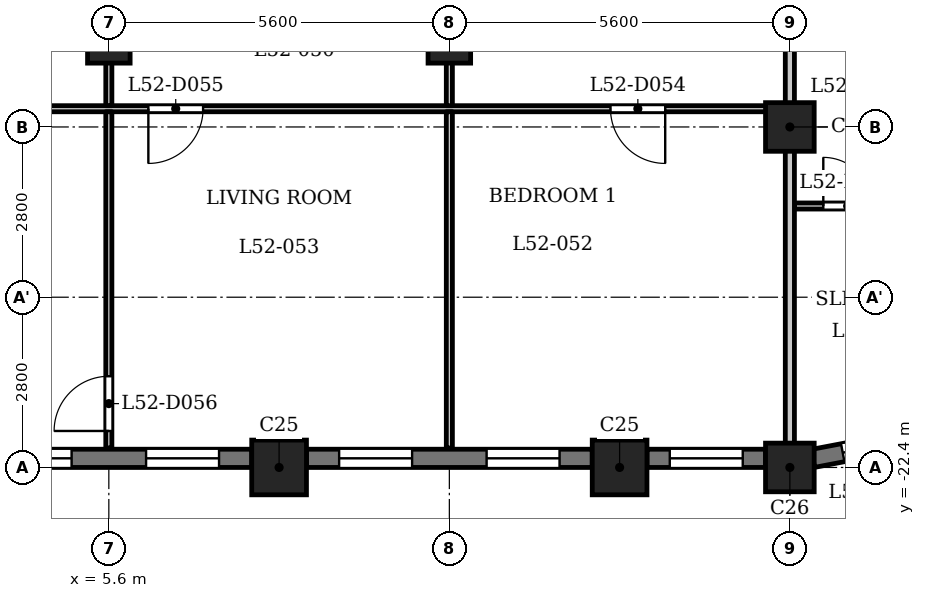
"""IFC4 building model, lengths in metres.
Left out: names, types, materials, properties, quantities, classifications, styles, units other than length and angle.
Written with IfcOpenShell. Run it as: python <this file> out.ifc"""

import sys

from ifc_helpers import new_model, si_unit, direction, frame, frame_2d, origin, origin_2d, place, context, subcontext, project, spatial, rectangle, extrude, element, fill, save


model = new_model("IFC4")
c1 = context("Model", 3, precision=1e-05, world=origin(), true_north=direction((0.0, 1.0)))
c2 = subcontext(c1, "Body", "Model", "MODEL_VIEW")
j1 = project(units=[si_unit("LENGTHUNIT", "METRE"), si_unit("PLANEANGLEUNIT", "RADIAN")], contexts=[c1])
p1 = place(None, origin())
s1 = spatial("IfcSite", under=j1, at=p1, CompositionType="ELEMENT")
p2 = place(p1, origin())
s2 = spatial("IfcBuilding", under=s1, at=p2, CompositionType="ELEMENT")
p3 = place(p2, frame((0.0, 0.0, 202.9)))
s3 = spatial("IfcBuildingStorey", under=s2, at=p3, CompositionType="ELEMENT", Elevation=202.9)
for number, where, z_axis, x_axis in (
    (1, (8.4, -22.4, 0.0), (0.0, 0.0, 1.0), (1.0, 0.0, 0.0)),
    (2, (14.0, -22.4, 0.0), (0.0, 0.0, 1.0), (1.0, 0.0, 0.0)),
):
    element("IfcColumn", number, at=place(p3, frame(where, z_axis=z_axis, x_axis=x_axis)), inside=s3, PredefinedType="COLUMN", context=c2, shape_type="SweptSolid", body=[
        extrude(rectangle(XDim=0.9, YDim=0.9, at=origin_2d()), origin(), (0.0, 0.0, 1.0), 3.5),
    ])
for number, where, z_axis, x_axis in (
    (3, (16.8, -22.4, 0.0), (0.0, 0.0, 1.0), (1.0, 0.0, 0.0)),
    (4, (16.8, -16.8, 0.0), (0.0, 0.0, 1.0), (1.0, 0.0, 0.0)),
):
    element("IfcColumn", number, at=place(p3, frame(where, z_axis=z_axis, x_axis=x_axis)), inside=s3, PredefinedType="COLUMN", context=c2, shape_type="SweptSolid", body=[
        extrude(rectangle(XDim=0.8, YDim=0.8, at=origin_2d()), origin(), (0.0, 0.0, 1.0), 3.5),
    ])
for number, where, z_axis, x_axis in (
    (5, (5.6, -15.4, 0.0), (0.0, 0.0, 1.0), (1.0, 0.0, 0.0)),
    (6, (11.2, -15.4, 0.0), (0.0, 0.0, 1.0), (1.0, 0.0, 0.0)),
):
    element("IfcColumn", number, at=place(p3, frame(where, z_axis=z_axis, x_axis=x_axis)), inside=s3, PredefinedType="COLUMN", context=c2, shape_type="SweptSolid", body=[
        extrude(rectangle(XDim=0.7, YDim=0.7, at=origin_2d()), origin(), (0.0, 0.0, 1.0), 3.5),
    ])
p4 = place(p3, frame((3.25, -22.25, 0.0), z_axis=(0.0, 0.0, 1.0), x_axis=(1.0, 0.0, 0.0)))
e7 = element("IfcWall", 7, at=p4, inside=s3, PredefinedType="SOLIDWALL", context=c2, shape_type="SweptSolid", body=[
    extrude(rectangle(XDim=4.7, YDim=0.3, at=frame_2d((2.35, 0.0))), origin(), (0.0, 0.0, 1.0), 2.5),
])
p5 = place(p4, frame((0.538, 0.0, 0.6)))
e8 = element("IfcOpeningElement", 8, at=p5, cuts=e7, PredefinedType="OPENING", context=c2, shape_type="SweptSolid", body=[
    extrude(rectangle(XDim=1.2, YDim=1.55, at=frame_2d((0.6, 0.775))), frame((0.0, 0.16, 0.0), z_axis=(0.0, -1.0, 0.0), x_axis=(1.0, 0.0, 0.0)), (0.0, 0.0, 1.0), 0.32),
])
p6 = place(p4, frame((2.962, 0.0, 0.6)))
e9 = element("IfcOpeningElement", 9, at=p6, cuts=e7, PredefinedType="OPENING", context=c2, shape_type="SweptSolid", body=[
    extrude(rectangle(XDim=1.2, YDim=1.55, at=frame_2d((0.6, 0.775))), frame((0.0, 0.16, 0.0), z_axis=(0.0, -1.0, 0.0), x_axis=(1.0, 0.0, 0.0)), (0.0, 0.0, 1.0), 0.32),
])
p7 = place(p3, frame((8.85, -22.25, 0.0), z_axis=(0.0, 0.0, 1.0), x_axis=(1.0, 0.0, 0.0)))
e10 = element("IfcWall", 10, at=p7, inside=s3, PredefinedType="SOLIDWALL", context=c2, shape_type="SweptSolid", body=[
    extrude(rectangle(XDim=4.7, YDim=0.3, at=frame_2d((2.35, 0.0))), origin(), (0.0, 0.0, 1.0), 2.5),
])
p8 = place(p7, frame((0.538, 0.0, 0.6)))
e11 = element("IfcOpeningElement", 11, at=p8, cuts=e10, PredefinedType="OPENING", context=c2, shape_type="SweptSolid", body=[
    extrude(rectangle(XDim=1.2, YDim=1.55, at=frame_2d((0.6, 0.775))), frame((0.0, 0.16, 0.0), z_axis=(0.0, -1.0, 0.0), x_axis=(1.0, 0.0, 0.0)), (0.0, 0.0, 1.0), 0.32),
])
p9 = place(p7, frame((2.962, 0.0, 0.6)))
e12 = element("IfcOpeningElement", 12, at=p9, cuts=e10, PredefinedType="OPENING", context=c2, shape_type="SweptSolid", body=[
    extrude(rectangle(XDim=1.2, YDim=1.55, at=frame_2d((0.6, 0.775))), frame((0.0, 0.16, 0.0), z_axis=(0.0, -1.0, 0.0), x_axis=(1.0, 0.0, 0.0)), (0.0, 0.0, 1.0), 0.32),
])
p10 = place(p3, frame((14.45, -22.25, 0.0), z_axis=(0.0, 0.0, 1.0), x_axis=(1.0, 0.0, 0.0)))
e13 = element("IfcWall", 13, at=p10, inside=s3, PredefinedType="SOLIDWALL", context=c2, shape_type="SweptSolid", body=[
    extrude(rectangle(XDim=1.95, YDim=0.3, at=frame_2d((0.975, 0.0))), origin(), (0.0, 0.0, 1.0), 2.5),
])
p11 = place(p10, frame((0.375, 0.0, 0.6)))
e14 = element("IfcOpeningElement", 14, at=p11, cuts=e13, PredefinedType="OPENING", context=c2, shape_type="SweptSolid", body=[
    extrude(rectangle(XDim=1.2, YDim=1.55, at=frame_2d((0.6, 0.775))), frame((0.0, 0.16, 0.0), z_axis=(0.0, -1.0, 0.0), x_axis=(1.0, 0.0, 0.0)), (0.0, 0.0, 1.0), 0.32),
])
p12 = place(p3, frame((17.179, -22.251, 0.0), z_axis=(0.0, 0.0, 1.0), x_axis=(0.98230529033, 0.187286722942, 0.0)))
e15 = element("IfcWall", 15, at=p12, inside=s3, PredefinedType="SOLIDWALL", context=c2, shape_type="SweptSolid", body=[
    extrude(rectangle(XDim=1.799, YDim=0.3, at=frame_2d((0.899, 0.0))), origin(), (0.0, 0.0, 1.0), 2.5),
])
p13 = place(p12, frame((0.5, 0.0, 0.6)))
e16 = element("IfcOpeningElement", 16, at=p13, cuts=e15, PredefinedType="OPENING", context=c2, shape_type="SweptSolid", body=[
    extrude(rectangle(XDim=0.8, YDim=1.55, at=frame_2d((0.4, 0.775))), frame((0.0, 0.16, 0.0), z_axis=(0.0, -1.0, 0.0), x_axis=(1.0, 0.0, 0.0)), (0.0, 0.0, 1.0), 0.32),
])
p14 = place(p3, frame((16.875, -18.1, 0.0), z_axis=(0.0, 0.0, 1.0), x_axis=(1.0, 0.0, 0.0)))
e17 = element("IfcWall", 17, at=p14, inside=s3, PredefinedType="PARTITIONING", context=c2, shape_type="SweptSolid", body=[
    extrude(rectangle(XDim=6.765, YDim=0.1, at=frame_2d((3.382, 0.0))), origin(), (0.0, 0.0, 1.0), 3.2),
])
p15 = place(p14, frame((0.475, 0.0, 0.0)))
e18 = element("IfcOpeningElement", 18, at=p15, cuts=e17, PredefinedType="OPENING", context=c2, shape_type="SweptSolid", body=[
    extrude(rectangle(XDim=0.8, YDim=2.1, at=frame_2d((0.4, 1.05))), frame((0.0, 0.06, 0.0), z_axis=(0.0, -1.0, 0.0), x_axis=(1.0, 0.0, 0.0)), (0.0, 0.0, 1.0), 0.12),
])
p16 = place(p14, frame((2.575, 0.0, 0.0)))
e19 = element("IfcOpeningElement", 19, at=p16, cuts=e17, PredefinedType="OPENING", context=c2, shape_type="SweptSolid", body=[
    extrude(rectangle(XDim=0.9, YDim=2.1, at=frame_2d((0.45, 1.05))), frame((0.0, 0.06, 0.0), z_axis=(0.0, -1.0, 0.0), x_axis=(1.0, 0.0, 0.0)), (0.0, 0.0, 1.0), 0.12),
])
p17 = place(p3, frame((-16.725, -16.5, 0.0), z_axis=(0.0, 0.0, 1.0), x_axis=(1.0, 0.0, 0.0)))
e20 = element("IfcWall", 20, at=p17, inside=s3, PredefinedType="PARTITIONING", context=c2, shape_type="SweptSolid", body=[
    extrude(rectangle(XDim=33.45, YDim=0.1, at=frame_2d((16.725, 0.0))), origin(), (0.0, 0.0, 1.0), 3.2),
])
p18 = place(p17, frame((4.075, 0.0, 0.0)))
e21 = element("IfcOpeningElement", 21, at=p18, cuts=e20, PredefinedType="OPENING", context=c2, shape_type="SweptSolid", body=[
    extrude(rectangle(XDim=0.9, YDim=2.1, at=frame_2d((0.45, 1.05))), frame((0.0, 0.06, 0.0), z_axis=(0.0, -1.0, 0.0), x_axis=(1.0, 0.0, 0.0)), (0.0, 0.0, 1.0), 0.12),
])
p19 = place(p17, frame((6.175, 0.0, 0.0)))
e22 = element("IfcOpeningElement", 22, at=p19, cuts=e20, PredefinedType="OPENING", context=c2, shape_type="SweptSolid", body=[
    extrude(rectangle(XDim=0.9, YDim=2.1, at=frame_2d((0.45, 1.05))), frame((0.0, 0.06, 0.0), z_axis=(0.0, -1.0, 0.0), x_axis=(1.0, 0.0, 0.0)), (0.0, 0.0, 1.0), 0.12),
])
p20 = place(p17, frame((30.575, 0.0, 0.0)))
e23 = element("IfcOpeningElement", 23, at=p20, cuts=e20, PredefinedType="OPENING", context=c2, shape_type="SweptSolid", body=[
    extrude(rectangle(XDim=0.9, YDim=2.1, at=frame_2d((0.45, 1.05))), frame((0.0, 0.06, 0.0), z_axis=(0.0, -1.0, 0.0), x_axis=(1.0, 0.0, 0.0)), (0.0, 0.0, 1.0), 0.12),
])
p21 = place(p17, frame((22.975, 0.0, 0.0)))
e24 = element("IfcOpeningElement", 24, at=p21, cuts=e20, PredefinedType="OPENING", context=c2, shape_type="SweptSolid", body=[
    extrude(rectangle(XDim=0.9, YDim=2.1, at=frame_2d((0.45, 1.05))), frame((0.0, 0.06, 0.0), z_axis=(0.0, -1.0, 0.0), x_axis=(1.0, 0.0, 0.0)), (0.0, 0.0, 1.0), 0.12),
])
p22 = place(p3, frame((5.6, -22.08, 0.0), z_axis=(0.0, 0.0, 1.0), x_axis=(0.0, 1.0, 0.0)))
e25 = element("IfcWall", 25, at=p22, inside=s3, PredefinedType="PARTITIONING", context=c2, shape_type="SweptSolid", body=[
    extrude(rectangle(XDim=5.53, YDim=0.1, at=frame_2d((2.765, 0.0))), origin(), (0.0, 0.0, 1.0), 3.2),
])
p23 = place(p22, frame((0.28, 0.0, 0.0)))
e26 = element("IfcOpeningElement", 26, at=p23, cuts=e25, PredefinedType="OPENING", context=c2, shape_type="SweptSolid", body=[
    extrude(rectangle(XDim=0.9, YDim=2.1, at=frame_2d((0.45, 1.05))), frame((0.0, 0.06, 0.0), z_axis=(0.0, -1.0, 0.0), x_axis=(1.0, 0.0, 0.0)), (0.0, 0.0, 1.0), 0.12),
])
p24 = place(p3, frame((5.6, -16.45, 0.0), z_axis=(0.0, 0.0, 1.0), x_axis=(0.0, 1.0, 0.0)))
e27 = element("IfcWall", 27, at=p24, inside=s3, PredefinedType="PARTITIONING", context=c2, shape_type="SweptSolid", body=[
    extrude(rectangle(XDim=3.175, YDim=0.1, at=frame_2d((1.587, 0.0))), origin(), (0.0, 0.0, 1.0), 3.2),
])
p25 = place(p24, frame((1.799, 0.0, 0.0)))
e28 = element("IfcOpeningElement", 28, at=p25, cuts=e27, PredefinedType="OPENING", context=c2, shape_type="SweptSolid", body=[
    extrude(rectangle(XDim=0.8, YDim=2.1, at=frame_2d((0.4, 1.05))), frame((0.0, 0.06, 0.0), z_axis=(0.0, -1.0, 0.0), x_axis=(1.0, 0.0, 0.0)), (0.0, 0.0, 1.0), 0.12),
])
p26 = place(p3, frame((11.2, -22.08, 0.0), z_axis=(0.0, 0.0, 1.0), x_axis=(0.0, 1.0, 0.0)))
e29 = element("IfcWall", 29, at=p26, inside=s3, PredefinedType="PARTITIONING", context=c2, shape_type="SweptSolid", body=[
    extrude(rectangle(XDim=5.53, YDim=0.1, at=frame_2d((2.765, 0.0))), origin(), (0.0, 0.0, 1.0), 3.2),
])
p27 = place(p3, frame((11.2, -16.45, 0.0), z_axis=(0.0, 0.0, 1.0), x_axis=(0.0, 1.0, 0.0)))
e30 = element("IfcWall", 30, at=p27, inside=s3, PredefinedType="PARTITIONING", context=c2, shape_type="SweptSolid", body=[
    extrude(rectangle(XDim=3.175, YDim=0.1, at=frame_2d((1.587, 0.0))), origin(), (0.0, 0.0, 1.0), 3.2),
])
p28 = place(p27, frame((1.699, 0.0, 0.0)))
e31 = element("IfcOpeningElement", 31, at=p28, cuts=e30, PredefinedType="OPENING", context=c2, shape_type="SweptSolid", body=[
    extrude(rectangle(XDim=0.9, YDim=2.1, at=frame_2d((0.45, 1.05))), frame((0.0, 0.06, 0.0), z_axis=(0.0, -1.0, 0.0), x_axis=(1.0, 0.0, 0.0)), (0.0, 0.0, 1.0), 0.12),
])
p29 = place(p3, frame((16.8, -22.31, 0.0), z_axis=(0.0, 0.0, 1.0), x_axis=(0.0, 1.0, 0.0)))
e32 = element("IfcWall", 32, at=p29, inside=s3, PredefinedType="PARTITIONING", context=c2, shape_type="SweptSolid", body=[
    extrude(rectangle(XDim=6.835, YDim=0.15, at=frame_2d((3.417, 0.0))), origin(), (0.0, 0.0, 1.0), 2.55),
])
p30 = place(p20, origin())
e33 = element("IfcDoor", 33, at=p30, inside=s3, OperationType="SINGLE_SWING_RIGHT", PredefinedType="DOOR", context=c2, shape_type="SweptSolid", body=[
    extrude(rectangle(XDim=0.9, YDim=2.1, at=frame_2d((0.45, 1.05))), frame((0.0, 0.025, 0.0), z_axis=(0.0, -1.0, 0.0), x_axis=(1.0, 0.0, 0.0)), (0.0, 0.0, 1.0), 0.05),
])
fill(e23, e33)
p31 = place(p21, origin())
e34 = element("IfcDoor", 34, at=p31, inside=s3, OperationType="SINGLE_SWING_LEFT", PredefinedType="DOOR", context=c2, shape_type="SweptSolid", body=[
    extrude(rectangle(XDim=0.9, YDim=2.1, at=frame_2d((0.45, 1.05))), frame((0.0, 0.025, 0.0), z_axis=(0.0, -1.0, 0.0), x_axis=(1.0, 0.0, 0.0)), (0.0, 0.0, 1.0), 0.05),
])
fill(e24, e34)
p32 = place(p23, origin())
e35 = element("IfcDoor", 35, at=p32, inside=s3, OperationType="SINGLE_SWING_RIGHT", PredefinedType="DOOR", context=c2, shape_type="SweptSolid", body=[
    extrude(rectangle(XDim=0.9, YDim=2.1, at=frame_2d((0.45, 1.05))), frame((0.0, 0.025, 0.0), z_axis=(0.0, -1.0, 0.0), x_axis=(1.0, 0.0, 0.0)), (0.0, 0.0, 1.0), 0.05),
])
fill(e26, e35)
p33 = place(p15, origin())
e36 = element("IfcDoor", 36, at=p33, inside=s3, OperationType="SINGLE_SWING_RIGHT", PredefinedType="DOOR", context=c2, shape_type="SweptSolid", body=[
    extrude(rectangle(XDim=0.8, YDim=2.1, at=frame_2d((0.4, 1.05))), frame((0.0, 0.025, 0.0), z_axis=(0.0, -1.0, 0.0), x_axis=(1.0, 0.0, 0.0)), (0.0, 0.0, 1.0), 0.05),
])
fill(e18, e36)
p34 = place(p5, origin())
e37 = element("IfcWindow", 37, at=p34, inside=s3, PartitioningType="SINGLE_PANEL", PredefinedType="WINDOW", context=c2, shape_type="SweptSolid", body=[
    extrude(rectangle(XDim=1.2, YDim=1.55, at=frame_2d((0.6, 0.775))), frame((0.0, 0.03, 0.0), z_axis=(0.0, -1.0, 0.0), x_axis=(1.0, 0.0, 0.0)), (0.0, 0.0, 1.0), 0.06),
])
fill(e8, e37)
p35 = place(p6, origin())
e38 = element("IfcWindow", 38, at=p35, inside=s3, PartitioningType="SINGLE_PANEL", PredefinedType="WINDOW", context=c2, shape_type="SweptSolid", body=[
    extrude(rectangle(XDim=1.2, YDim=1.55, at=frame_2d((0.6, 0.775))), frame((0.0, 0.03, 0.0), z_axis=(0.0, -1.0, 0.0), x_axis=(1.0, 0.0, 0.0)), (0.0, 0.0, 1.0), 0.06),
])
fill(e9, e38)
p36 = place(p8, origin())
e39 = element("IfcWindow", 39, at=p36, inside=s3, PartitioningType="SINGLE_PANEL", PredefinedType="WINDOW", context=c2, shape_type="SweptSolid", body=[
    extrude(rectangle(XDim=1.2, YDim=1.55, at=frame_2d((0.6, 0.775))), frame((0.0, 0.03, 0.0), z_axis=(0.0, -1.0, 0.0), x_axis=(1.0, 0.0, 0.0)), (0.0, 0.0, 1.0), 0.06),
])
fill(e11, e39)
p37 = place(p9, origin())
e40 = element("IfcWindow", 40, at=p37, inside=s3, PartitioningType="SINGLE_PANEL", PredefinedType="WINDOW", context=c2, shape_type="SweptSolid", body=[
    extrude(rectangle(XDim=1.2, YDim=1.55, at=frame_2d((0.6, 0.775))), frame((0.0, 0.03, 0.0), z_axis=(0.0, -1.0, 0.0), x_axis=(1.0, 0.0, 0.0)), (0.0, 0.0, 1.0), 0.06),
])
fill(e12, e40)
p38 = place(p11, origin())
e41 = element("IfcWindow", 41, at=p38, inside=s3, PartitioningType="SINGLE_PANEL", PredefinedType="WINDOW", context=c2, shape_type="SweptSolid", body=[
    extrude(rectangle(XDim=1.2, YDim=1.55, at=frame_2d((0.6, 0.775))), frame((0.0, 0.03, 0.0), z_axis=(0.0, -1.0, 0.0), x_axis=(1.0, 0.0, 0.0)), (0.0, 0.0, 1.0), 0.06),
])
fill(e14, e41)
p39 = place(p13, origin())
e42 = element("IfcWindow", 42, at=p39, inside=s3, PartitioningType="SINGLE_PANEL", PredefinedType="WINDOW", context=c2, shape_type="SweptSolid", body=[
    extrude(rectangle(XDim=0.8, YDim=1.55, at=frame_2d((0.4, 0.775))), frame((0.0, 0.03, 0.0), z_axis=(0.0, -1.0, 0.0), x_axis=(1.0, 0.0, 0.0)), (0.0, 0.0, 1.0), 0.06),
])
fill(e16, e42)
save(model, sys.argv[1])
